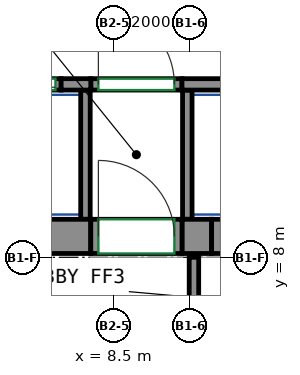
"""IFC4 building model, lengths in metres.
Left out: names, types, materials, properties, quantities, classifications, styles, units other than length and angle.
Written with IfcOpenShell. Run it as: python <this file> out.ifc"""

import sys

from ifc_helpers import new_model, si_unit, direction, frame, frame_2d, origin, place, context, subcontext, project, spatial, rectangle, extrude, source, transform, mapped, element, fill, save


model = new_model("IFC4")
c1 = context("Model", 3, precision=1e-05, world=origin(), true_north=direction((0.0, 1.0)))
c2 = subcontext(c1, "Body", "Model", "MODEL_VIEW")
j1 = project(units=[si_unit("LENGTHUNIT", "METRE"), si_unit("PLANEANGLEUNIT", "RADIAN")], contexts=[c1])
p1 = place(None, origin())
s1 = spatial("IfcSite", under=j1, at=p1, CompositionType="ELEMENT")
p2 = place(p1, origin())
s2 = spatial("IfcBuilding", under=s1, at=p2, CompositionType="ELEMENT")
p3 = place(p2, frame((0.0, 0.0, 154.1)))
s3 = spatial("IfcBuildingStorey", under=s2, at=p3, CompositionType="ELEMENT", Elevation=154.1)
m1 = source(origin(), c2, "Body", "SweptSolid", [
    extrude(rectangle(XDim=14.18, YDim=0.9, at=frame_2d((7.09, 0.0))), origin(), (0.0, 0.0, 1.0), 3.12),
])
p4 = place(p3, frame((-6.29, 8.55, 0.0), z_axis=(0.0, 0.0, 1.0), x_axis=(1.0, 0.0, 0.0)))
e1 = element("IfcWall", 1, at=p4, inside=s3, PredefinedType="SHEAR", context=c2, shape_type="MappedRepresentation", body=[
    mapped(m1, transform((0.0, 0.0, 0.0))),
])
m2 = source(origin(), c2, "Body", "SweptSolid", [
    extrude(rectangle(XDim=0.78, YDim=0.9, at=frame_2d((0.39, 0.0))), origin(), (0.0, 0.0, 1.0), 3.12),
])
p5 = place(p3, frame((10.29, 8.55, 0.0), z_axis=(0.0, 0.0, 1.0), x_axis=(1.0, 0.0, 0.0)))
e2 = element("IfcWall", 2, at=p5, inside=s3, PredefinedType="SHEAR", context=c2, shape_type="MappedRepresentation", body=[
    mapped(m2, transform((0.0, 0.0, 0.0))),
])
m3 = source(origin(), c2, "Body", "SweptSolid", [
    extrude(rectangle(XDim=0.78, YDim=0.3, at=frame_2d((0.39, 0.0))), origin(), (0.0, 0.0, 1.0), 3.12),
])
p6 = place(p3, frame((7.11, 12.55, 0.0), z_axis=(0.0, 0.0, 1.0), x_axis=(1.0, 0.0, 0.0)))
e3 = element("IfcWall", 3, at=p6, inside=s3, PredefinedType="SHEAR", context=c2, shape_type="MappedRepresentation", body=[
    mapped(m3, transform((0.0, 0.0, 0.0))),
])
m4 = source(origin(), c2, "Body", "SweptSolid", [
    extrude(rectangle(XDim=2.82, YDim=0.3, at=frame_2d((1.41, 0.0))), origin(), (0.0, 0.0, 1.0), 3.12),
])
p7 = place(p3, frame((10.29, 12.55, 0.0), z_axis=(0.0, 0.0, 1.0), x_axis=(1.0, 0.0, 0.0)))
e4 = element("IfcWall", 4, at=p7, inside=s3, PredefinedType="SHEAR", context=c2, shape_type="MappedRepresentation", body=[
    mapped(m4, transform((0.0, 0.0, 0.0))),
])
m5 = source(origin(), c2, "Body", "SweptSolid", [
    extrude(rectangle(XDim=1.4, YDim=0.3, at=frame_2d((0.7, 0.0))), origin(), (0.0, 0.0, 1.0), 3.12),
])
p8 = place(p3, frame((5.71, 12.55, 0.0), z_axis=(0.0, 0.0, 1.0), x_axis=(1.0, 0.0, 0.0)))
e5 = element("IfcWall", 5, at=p8, inside=s3, PredefinedType="PARTITIONING", context=c2, shape_type="MappedRepresentation", body=[
    mapped(m5, transform((0.0, 0.0, 0.0))),
])
p9 = place(p8, frame((0.15, 0.0, 0.0)))
e6 = element("IfcOpeningElement", 6, at=p9, cuts=e5, PredefinedType="OPENING", context=c2, shape_type="SweptSolid", body=[
    extrude(rectangle(XDim=1.1, YDim=2.1, at=frame_2d((0.55, 1.05))), frame((0.0, 0.16, 0.0), z_axis=(0.0, -1.0, 0.0), x_axis=(1.0, 0.0, 0.0)), (0.0, 0.0, 1.0), 0.32),
])
m6 = source(origin(), c2, "Body", "SweptSolid", [
    extrude(rectangle(XDim=2.4, YDim=0.3, at=frame_2d((1.2, 0.0))), origin(), (0.0, 0.0, 1.0), 3.12),
])
p10 = place(p3, frame((7.89, 12.55, 0.0), z_axis=(0.0, 0.0, 1.0), x_axis=(1.0, 0.0, 0.0)))
e7 = element("IfcWall", 7, at=p10, inside=s3, PredefinedType="PARTITIONING", context=c2, shape_type="MappedRepresentation", body=[
    mapped(m6, transform((0.0, 0.0, 0.0))),
])
p11 = place(p10, frame((0.2, 0.0, 0.0)))
e8 = element("IfcOpeningElement", 8, at=p11, cuts=e7, PredefinedType="OPENING", context=c2, shape_type="SweptSolid", body=[
    extrude(rectangle(XDim=2.0, YDim=2.1, at=frame_2d((1.0, 1.05))), frame((0.0, 0.16, 0.0), z_axis=(0.0, -1.0, 0.0), x_axis=(1.0, 0.0, 0.0)), (0.0, 0.0, 1.0), 0.32),
])
m7 = source(origin(), c2, "Body", "SweptSolid", [
    extrude(rectangle(XDim=2.65, YDim=0.25, at=frame_2d((1.325, 0.0))), origin(), (0.0, 0.0, 1.0), 3.12),
])
p12 = place(p3, frame((10.605, 5.35, 0.0), z_axis=(0.0, 0.0, 1.0), x_axis=(0.0, 1.0, 0.0)))
e9 = element("IfcWall", 9, at=p12, inside=s3, PredefinedType="PARTITIONING", context=c2, shape_type="MappedRepresentation", body=[
    mapped(m7, transform((0.0, 0.0, 0.0))),
])
m8 = source(origin(), c2, "Body", "SweptSolid", [
    extrude(rectangle(XDim=3.4, YDim=0.25, at=frame_2d((1.7, 0.0))), origin(), (0.0, 0.0, 1.0), 3.12),
])
for number, where, z_axis, x_axis in (
    (10, (10.43, 9.0, 0.0), (0.0, 0.0, 1.0), (0.0, 1.0, 0.0)),
    (11, (7.75, 9.0, 0.0), (0.0, 0.0, 1.0), (0.0, 1.0, 0.0)),
):
    element("IfcWall", number, at=place(p3, frame(where, z_axis=z_axis, x_axis=x_axis)), inside=s3, PredefinedType="PARTITIONING", context=c2, shape_type="MappedRepresentation", body=[
        mapped(m8, transform((0.0, 0.0, 0.0))),
    ])
m9 = source(origin(), c2, "Body", "SweptSolid", [
    extrude(rectangle(XDim=2.4, YDim=0.9, at=frame_2d((1.2, 0.0))), origin(), (0.0, 0.0, 1.0), 2.7),
])
p13 = place(p3, frame((7.89, 8.55, 0.0), z_axis=(0.0, 0.0, 1.0), x_axis=(1.0, 0.0, 0.0)))
e12 = element("IfcWall", 12, at=p13, inside=s3, PredefinedType="PARTITIONING", context=c2, shape_type="MappedRepresentation", body=[
    mapped(m9, transform((0.0, 0.0, 0.0))),
])
p14 = place(p13, frame((0.2, 0.0, 0.0)))
e13 = element("IfcOpeningElement", 13, at=p14, cuts=e12, PredefinedType="OPENING", context=c2, shape_type="SweptSolid", body=[
    extrude(rectangle(XDim=2.0, YDim=2.1, at=frame_2d((1.0, 1.05))), frame((0.0, 0.46, 0.0), z_axis=(0.0, -1.0, 0.0), x_axis=(1.0, 0.0, 0.0)), (0.0, 0.0, 1.0), 0.92),
])
m10 = source(origin(), c2, "Body", "SweptSolid", [
    extrude(rectangle(XDim=1.4, YDim=0.9, at=frame_2d((0.7, 0.0))), origin(), (0.0, 0.0, 1.0), 2.7),
])
p15 = place(p3, frame((11.07, 8.55, 0.0), z_axis=(0.0, 0.0, 1.0), x_axis=(1.0, 0.0, 0.0)))
e14 = element("IfcWall", 14, at=p15, inside=s3, PredefinedType="PARTITIONING", context=c2, shape_type="MappedRepresentation", body=[
    mapped(m10, transform((0.0, 0.0, 0.0))),
])
p16 = place(p15, frame((0.25, 0.0, 0.0)))
e15 = element("IfcOpeningElement", 15, at=p16, cuts=e14, PredefinedType="OPENING", context=c2, shape_type="SweptSolid", body=[
    extrude(rectangle(XDim=0.9, YDim=2.1, at=frame_2d((0.45, 1.05))), frame((0.0, 0.46, 0.0), z_axis=(0.0, -1.0, 0.0), x_axis=(1.0, 0.0, 0.0)), (0.0, 0.0, 1.0), 0.92),
])
p17 = place(p11, origin())
e16 = element("IfcDoor", 16, at=p17, inside=s3, OperationType="DOUBLE_DOOR_SINGLE_SWING", PredefinedType="DOOR", context=c2, shape_type="SweptSolid", body=[
    extrude(rectangle(XDim=2.0, YDim=2.1, at=frame_2d((1.0, 1.05))), frame((0.0, 0.025, 0.0), z_axis=(0.0, -1.0, 0.0), x_axis=(1.0, 0.0, 0.0)), (0.0, 0.0, 1.0), 0.05),
])
fill(e8, e16)
p18 = place(p14, origin())
e17 = element("IfcDoor", 17, at=p18, inside=s3, OperationType="DOUBLE_DOOR_SINGLE_SWING", PredefinedType="DOOR", context=c2, shape_type="SweptSolid", body=[
    extrude(rectangle(XDim=2.0, YDim=2.1, at=frame_2d((1.0, 1.05))), frame((0.0, 0.355, 0.0), z_axis=(0.0, -1.0, 0.0), x_axis=(1.0, 0.0, 0.0)), (0.0, 0.0, 1.0), 0.05),
])
fill(e13, e17)
p19 = place(p9, origin())
e18 = element("IfcDoor", 18, at=p19, inside=s3, OperationType="DOUBLE_DOOR_SLIDING", PredefinedType="DOOR", context=c2, shape_type="SweptSolid", body=[
    extrude(rectangle(XDim=1.1, YDim=2.1, at=frame_2d((0.55, 1.05))), frame((0.0, 0.025, 0.0), z_axis=(0.0, -1.0, 0.0), x_axis=(1.0, 0.0, 0.0)), (0.0, 0.0, 1.0), 0.05),
])
fill(e6, e18)
save(model, sys.argv[1])
